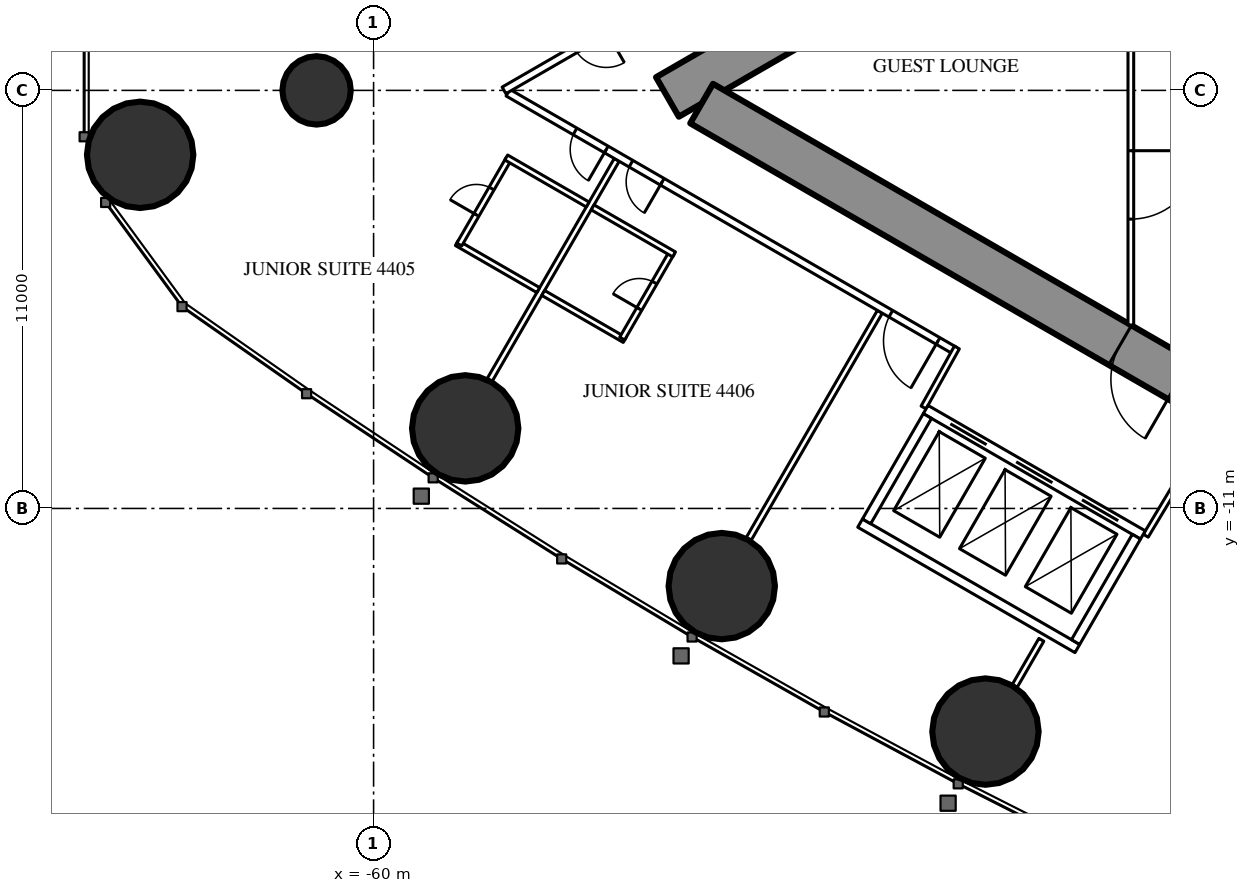
"""IFC4 building model, lengths in metres.
Left out: names, types, materials, properties, quantities, classifications, styles, units other than length and angle.
Written with IfcOpenShell. Run it as: python <this file> out.ifc"""

import sys

from ifc_helpers import new_model, si_unit, direction, frame, frame_2d, origin, origin_2d, place, context, subcontext, project, spatial, rectangle, circle, extrude, element, fill, save


model = new_model("IFC4")
c1 = context("Model", 3, precision=1e-05, world=origin(), true_north=direction((0.0, 1.0)))
c2 = subcontext(c1, "Body", "Model", "MODEL_VIEW")
j1 = project(units=[si_unit("LENGTHUNIT", "METRE"), si_unit("PLANEANGLEUNIT", "RADIAN")], contexts=[c1])
p1 = place(None, origin())
s1 = spatial("IfcSite", under=j1, at=p1, CompositionType="ELEMENT")
p2 = place(p1, origin())
s2 = spatial("IfcBuilding", under=s1, at=p2, CompositionType="ELEMENT")
p3 = place(p2, frame((0.0, 0.0, 166.8)))
s3 = spatial("IfcBuildingStorey", under=s2, at=p3, CompositionType="ELEMENT", Elevation=166.8)
for number, where, z_axis, x_axis in (
    (1, (-66.143, -1.695, 0.0), (0.0, 0.0, 1.0), (1.0, 0.0, 0.0)),
    (2, (-57.59, -8.893, 0.0), (0.0, 0.0, 1.0), (1.0, 0.0, 0.0)),
    (3, (-50.839, -13.043, 0.0), (0.0, 0.0, 1.0), (1.0, 0.0, 0.0)),
    (4, (-43.9, -16.871, 0.0), (0.0, 0.0, 1.0), (1.0, 0.0, 0.0)),
):
    element("IfcColumn", number, at=place(p3, frame(where, z_axis=z_axis, x_axis=x_axis)), inside=s3, PredefinedType="COLUMN", context=c2, shape_type="SweptSolid", body=[
        extrude(circle(Radius=1.4, at=origin_2d()), origin(), (0.0, 0.0, 1.0), 3.5),
    ])
p4 = place(p3, frame((-61.5, 0.0, 0.0), z_axis=(0.0, 0.0, 1.0), x_axis=(1.0, 0.0, 0.0)))
e5 = element("IfcColumn", 5, at=p4, inside=s3, PredefinedType="COLUMN", context=c2, shape_type="SweptSolid", body=[
    extrude(circle(Radius=0.9, at=origin_2d()), origin(), (0.0, 0.0, 1.0), 3.5),
])
p5 = place(p3, frame((-27.2, 14.3, 0.0), z_axis=(0.0, 0.0, 1.0), x_axis=(-0.866026593062, -0.499997940104, 0.0)))
e6 = element("IfcWall", 6, at=p5, inside=s3, PredefinedType="SHEAR", context=c2, shape_type="SweptSolid", body=[
    extrude(rectangle(XDim=28.946, YDim=1.2, at=frame_2d((14.473, 0.0))), origin(), (0.0, 0.0, 1.0), 3.5),
])
p6 = place(p5, frame((4.6, 0.0, 0.0)))
e7 = element("IfcOpeningElement", 7, at=p6, cuts=e6, PredefinedType="OPENING", context=c2, shape_type="SweptSolid", body=[
    extrude(rectangle(XDim=1.0, YDim=2.2, at=frame_2d((0.5, 1.1))), frame((0.0, 0.61, 0.0), z_axis=(0.0, -1.0, 0.0), x_axis=(1.0, 0.0, 0.0)), (0.0, 0.0, 1.0), 1.22),
])
p7 = place(p5, frame((13.395, 0.0, 0.0)))
e8 = element("IfcOpeningElement", 8, at=p7, cuts=e6, PredefinedType="OPENING", context=c2, shape_type="SweptSolid", body=[
    extrude(rectangle(XDim=1.8, YDim=2.2, at=frame_2d((0.9, 1.1))), frame((0.0, 0.61, 0.0), z_axis=(0.0, -1.0, 0.0), x_axis=(1.0, 0.0, 0.0)), (0.0, 0.0, 1.0), 1.22),
])
p8 = place(p3, frame((-27.2, -14.3, 0.0), z_axis=(0.0, 0.0, 1.0), x_axis=(-0.866024021859, 0.500002393557, 0.0)))
e9 = element("IfcWall", 9, at=p8, inside=s3, PredefinedType="SHEAR", context=c2, shape_type="SweptSolid", body=[
    extrude(rectangle(XDim=27.907, YDim=1.2, at=frame_2d((13.954, 0.0))), origin(), (0.0, 0.0, 1.0), 3.5),
])
p9 = place(p8, frame((4.6, 0.0, 0.0)))
e10 = element("IfcOpeningElement", 10, at=p9, cuts=e9, PredefinedType="OPENING", context=c2, shape_type="SweptSolid", body=[
    extrude(rectangle(XDim=1.0, YDim=2.2, at=frame_2d((0.5, 1.1))), frame((0.0, 0.61, 0.0), z_axis=(0.0, -1.0, 0.0), x_axis=(1.0, 0.0, 0.0)), (0.0, 0.0, 1.0), 1.22),
])
p10 = place(p8, frame((13.395, 0.0, 0.0)))
e11 = element("IfcOpeningElement", 11, at=p10, cuts=e9, PredefinedType="OPENING", context=c2, shape_type="SweptSolid", body=[
    extrude(rectangle(XDim=1.8, YDim=2.2, at=frame_2d((0.9, 1.1))), frame((0.0, 0.61, 0.0), z_axis=(0.0, -1.0, 0.0), x_axis=(1.0, 0.0, 0.0)), (0.0, 0.0, 1.0), 1.22),
])
p11 = place(p3, frame((-46.679, -5.825, 0.0), z_axis=(0.0, 0.0, 1.0), x_axis=(-0.500006839597, -0.866021454905, 0.0)))
e12 = element("IfcWall", 12, at=p11, inside=s3, PredefinedType="PARTITIONING", context=c2, shape_type="SweptSolid", body=[
    extrude(rectangle(XDim=6.911, YDim=0.15, at=frame_2d((3.456, 0.0))), origin(), (0.0, 0.0, 1.0), 2.3),
])
p12 = place(p3, frame((-53.602, -1.828, 0.0), z_axis=(0.0, 0.0, 1.0), x_axis=(-0.49999191814, -0.866030069798, 0.0)))
e13 = element("IfcWall", 13, at=p12, inside=s3, PredefinedType="PARTITIONING", context=c2, shape_type="SweptSolid", body=[
    extrude(rectangle(XDim=6.692, YDim=0.15, at=frame_2d((3.346, 0.0))), origin(), (0.0, 0.0, 1.0), 2.3),
])
p13 = place(p3, frame((-42.429, -14.457, 0.0), z_axis=(0.0, 0.0, 1.0), x_axis=(-0.5000578829, -0.865991982497, 0.0)))
e14 = element("IfcWall", 14, at=p13, inside=s3, PredefinedType="PARTITIONING", context=c2, shape_type="SweptSolid", body=[
    extrude(rectangle(XDim=1.407, YDim=0.15, at=frame_2d((0.704, 0.0))), origin(), (0.0, 0.0, 1.0), 3.25),
])
p14 = place(p3, frame((-44.715, -6.844, 0.0), z_axis=(0.0, 0.0, 1.0), x_axis=(-0.866025261224, 0.500000246922, 0.0)))
e15 = element("IfcWall", 15, at=p14, inside=s3, PredefinedType="PARTITIONING", context=c2, shape_type="SweptSolid", body=[
    extrude(rectangle(XDim=13.567, YDim=0.2, at=frame_2d((6.783, 0.0))), origin(), (0.0, 0.0, 1.0), 3.25),
])
p15 = place(p14, frame((10.579, 0.0, 0.0)))
e16 = element("IfcOpeningElement", 16, at=p15, cuts=e15, PredefinedType="OPENING", context=c2, shape_type="SweptSolid", body=[
    extrude(rectangle(XDim=0.95, YDim=2.2, at=frame_2d((0.475, 1.1))), frame((0.0, 0.11, 0.0), z_axis=(0.0, -1.0, 0.0), x_axis=(1.0, 0.0, 0.0)), (0.0, 0.0, 1.0), 0.22),
])
p16 = place(p14, frame((8.879, 0.0, 0.0)))
e17 = element("IfcOpeningElement", 17, at=p16, cuts=e15, PredefinedType="OPENING", context=c2, shape_type="SweptSolid", body=[
    extrude(rectangle(XDim=0.95, YDim=2.2, at=frame_2d((0.475, 1.1))), frame((0.0, 0.11, 0.0), z_axis=(0.0, -1.0, 0.0), x_axis=(1.0, 0.0, 0.0)), (0.0, 0.0, 1.0), 0.22),
])
p17 = place(p14, frame((0.5, 0.0, 0.0)))
e18 = element("IfcOpeningElement", 18, at=p17, cuts=e15, PredefinedType="OPENING", context=c2, shape_type="SweptSolid", body=[
    extrude(rectangle(XDim=1.435, YDim=2.2, at=frame_2d((0.718, 1.1))), frame((0.0, 0.11, 0.0), z_axis=(0.0, -1.0, 0.0), x_axis=(1.0, 0.0, 0.0)), (0.0, 0.0, 1.0), 0.22),
])
for number, where, z_axis, x_axis in (
    (19, (-39.683, -11.718, 0.0), (0.0, 0.0, 1.0), (0.514, 0.858, 0.0)),
    (20, (-44.652, -6.764, 0.0), (0.0, 0.0, 1.0), (-0.485, -0.874, 0.0)),
):
    element("IfcWall", number, at=place(p3, frame(where, z_axis=z_axis, x_axis=x_axis)), inside=s3, PredefinedType="PARTITIONING", context=c2, shape_type="SweptSolid", body=[
        extrude(rectangle(XDim=1.805, YDim=0.15, at=frame_2d((0.903, 0.0))), origin(), (0.0, 0.0, 1.0), 3.25),
    ])
p18 = place(p3, frame((-46.65, 5.726, 0.0), z_axis=(0.0, 0.0, 1.0), x_axis=(-0.866027963864, -0.499995565786, 0.0)))
e21 = element("IfcWall", 21, at=p18, inside=s3, PredefinedType="PARTITIONING", context=c2, shape_type="SweptSolid", body=[
    extrude(rectangle(XDim=11.452, YDim=0.2, at=frame_2d((5.726, 0.0))), origin(), (0.0, 0.0, 1.0), 3.25),
])
p19 = place(p18, frame((4.294, 0.0, 0.0)))
e22 = element("IfcOpeningElement", 22, at=p19, cuts=e21, PredefinedType="OPENING", context=c2, shape_type="SweptSolid", body=[
    extrude(rectangle(XDim=0.95, YDim=2.2, at=frame_2d((0.475, 1.1))), frame((0.0, 0.11, 0.0), z_axis=(0.0, -1.0, 0.0), x_axis=(1.0, 0.0, 0.0)), (0.0, 0.0, 1.0), 0.22),
])
p20 = place(p18, frame((8.344, 0.0, 0.0)))
e23 = element("IfcOpeningElement", 23, at=p20, cuts=e21, PredefinedType="OPENING", context=c2, shape_type="SweptSolid", body=[
    extrude(rectangle(XDim=0.95, YDim=2.2, at=frame_2d((0.475, 1.1))), frame((0.0, 0.11, 0.0), z_axis=(0.0, -1.0, 0.0), x_axis=(1.0, 0.0, 0.0)), (0.0, 0.0, 1.0), 0.22),
])
p21 = place(p3, frame((-55.667, -5.255, 0.0), z_axis=(0.0, 0.0, 1.0), x_axis=(-0.866006523861, 0.500032699561, 0.0)))
e24 = element("IfcWall", 24, at=p21, inside=s3, PredefinedType="PARTITIONING", context=c2, shape_type="SweptSolid", body=[
    extrude(rectangle(XDim=2.475, YDim=0.15, at=frame_2d((1.237, 0.0))), origin(), (0.0, 0.0, 1.0), 3.25),
])
p22 = place(p3, frame((-56.446, -1.803, 0.0), z_axis=(0.0, 0.0, 1.0), x_axis=(-0.499936506574, -0.866062058628, 0.0)))
e25 = element("IfcWall", 25, at=p22, inside=s3, PredefinedType="PARTITIONING", context=c2, shape_type="SweptSolid", body=[
    extrude(rectangle(XDim=2.6, YDim=0.15, at=frame_2d((1.3, 0.0))), origin(), (0.0, 0.0, 1.0), 3.25),
])
p23 = place(p22, frame((0.9, 0.0, 0.0)))
e26 = element("IfcOpeningElement", 26, at=p23, cuts=e25, PredefinedType="OPENING", context=c2, shape_type="SweptSolid", body=[
    extrude(rectangle(XDim=0.8, YDim=2.2, at=frame_2d((0.4, 1.1))), frame((0.0, 0.085, 0.0), z_axis=(0.0, -1.0, 0.0), x_axis=(1.0, 0.0, 0.0)), (0.0, 0.0, 1.0), 0.17),
])
for number, where, z_axis, x_axis in (
    (27, (-54.367, -3.003, 0.0), (0.0, 0.0, 1.0), (-0.866, 0.5, 0.0)),
    (28, (-53.394, -6.567, 0.0), (0.0, 0.0, 1.0), (-0.866, 0.5, 0.0)),
):
    element("IfcWall", number, at=place(p3, frame(where, z_axis=z_axis, x_axis=x_axis)), inside=s3, PredefinedType="PARTITIONING", context=c2, shape_type="SweptSolid", body=[
        extrude(rectangle(XDim=2.475, YDim=0.15, at=frame_2d((1.238, 0.0))), origin(), (0.0, 0.0, 1.0), 3.25),
    ])
p24 = place(p3, frame((-52.159, -4.278, 0.0), z_axis=(0.0, 0.0, 1.0), x_axis=(-0.500047596559, -0.865997922154, 0.0)))
e29 = element("IfcWall", 29, at=p24, inside=s3, PredefinedType="PARTITIONING", context=c2, shape_type="SweptSolid", body=[
    extrude(rectangle(XDim=2.6, YDim=0.15, at=frame_2d((1.3, 0.0))), origin(), (0.0, 0.0, 1.0), 3.25),
])
p25 = place(p24, frame((0.9, 0.0, 0.0)))
e30 = element("IfcOpeningElement", 30, at=p25, cuts=e29, PredefinedType="OPENING", context=c2, shape_type="SweptSolid", body=[
    extrude(rectangle(XDim=0.8, YDim=2.2, at=frame_2d((0.4, 1.1))), frame((0.0, 0.085, 0.0), z_axis=(0.0, -1.0, 0.0), x_axis=(1.0, 0.0, 0.0)), (0.0, 0.0, 1.0), 0.17),
])
p26 = place(p3, frame((-52.094, -4.315, 0.0), z_axis=(0.0, 0.0, 1.0), x_axis=(-0.866006523861, 0.500032699561, 0.0)))
e31 = element("IfcWall", 31, at=p26, inside=s3, PredefinedType="PARTITIONING", context=c2, shape_type="SweptSolid", body=[
    extrude(rectangle(XDim=2.475, YDim=0.15, at=frame_2d((1.237, 0.0))), origin(), (0.0, 0.0, 1.0), 2.45),
])
p27 = place(p3, frame((-40.075, 1.2, 0.0), z_axis=(0.0, 0.0, 1.0), x_axis=(0.0, -1.0, 0.0)))
e32 = element("IfcWall", 32, at=p27, inside=s3, PredefinedType="PARTITIONING", context=c2, shape_type="SweptSolid", body=[
    extrude(rectangle(XDim=7.374, YDim=0.15, at=frame_2d((3.687, 0.0))), origin(), (0.0, 0.0, 1.0), 3.25),
])
p28 = place(p27, frame((2.787, 0.0, 0.0)))
e33 = element("IfcOpeningElement", 33, at=p28, cuts=e32, PredefinedType="OPENING", context=c2, shape_type="SweptSolid", body=[
    extrude(rectangle(XDim=1.8, YDim=2.2, at=frame_2d((0.9, 1.1))), frame((0.0, 0.085, 0.0), z_axis=(0.0, -1.0, 0.0), x_axis=(1.0, 0.0, 0.0)), (0.0, 0.0, 1.0), 0.17),
])
p29 = place(p3, frame((-39.758, -11.697, 0.0), z_axis=(0.0, 0.0, 1.0), x_axis=(-0.866024194504, 0.500002094529, 0.0)))
e34 = element("IfcWall", 34, at=p29, inside=s3, PredefinedType="PARTITIONING", context=c2, shape_type="SweptSolid", body=[
    extrude(rectangle(XDim=6.6, YDim=0.25, at=frame_2d((3.3, 0.0))), origin(), (0.0, 0.0, 1.0), 3.25),
])
p30 = place(p29, frame((0.75, 0.0, 0.0)))
e35 = element("IfcOpeningElement", 35, at=p30, cuts=e34, PredefinedType="OPENING", context=c2, shape_type="SweptSolid", body=[
    extrude(rectangle(XDim=1.1, YDim=2.2, at=frame_2d((0.55, 1.1))), frame((0.0, 0.135, 0.0), z_axis=(0.0, -1.0, 0.0), x_axis=(1.0, 0.0, 0.0)), (0.0, 0.0, 1.0), 0.27),
])
p31 = place(p29, frame((2.75, 0.0, 0.0)))
e36 = element("IfcOpeningElement", 36, at=p31, cuts=e34, PredefinedType="OPENING", context=c2, shape_type="SweptSolid", body=[
    extrude(rectangle(XDim=1.1, YDim=2.2, at=frame_2d((0.55, 1.1))), frame((0.0, 0.135, 0.0), z_axis=(0.0, -1.0, 0.0), x_axis=(1.0, 0.0, 0.0)), (0.0, 0.0, 1.0), 0.27),
])
p32 = place(p29, frame((4.75, 0.0, 0.0)))
e37 = element("IfcOpeningElement", 37, at=p32, cuts=e34, PredefinedType="OPENING", context=c2, shape_type="SweptSolid", body=[
    extrude(rectangle(XDim=1.1, YDim=2.2, at=frame_2d((0.55, 1.1))), frame((0.0, 0.135, 0.0), z_axis=(0.0, -1.0, 0.0), x_axis=(1.0, 0.0, 0.0)), (0.0, 0.0, 1.0), 0.27),
])
p33 = place(p3, frame((-41.482, -14.686, 0.0), z_axis=(0.0, 0.0, 1.0), x_axis=(-0.86603344179, 0.499986077507, 0.0)))
e38 = element("IfcWall", 38, at=p33, inside=s3, PredefinedType="PARTITIONING", context=c2, shape_type="SweptSolid", body=[
    extrude(rectangle(XDim=6.6, YDim=0.25, at=frame_2d((3.3, 0.0))), origin(), (0.0, 0.0, 1.0), 3.25),
])
for number, where, z_axis, x_axis in (
    (39, (-39.928, -11.743, 0.0), (0.0, 0.0, 1.0), (-0.5, -0.866, 0.0)),
    (40, (-45.428, -8.568, 0.0), (0.0, 0.0, 1.0), (-0.5, -0.866, 0.0)),
):
    element("IfcWall", number, at=place(p3, frame(where, z_axis=z_axis, x_axis=x_axis)), inside=s3, PredefinedType="PARTITIONING", context=c2, shape_type="SweptSolid", body=[
        extrude(rectangle(XDim=3.201, YDim=0.25, at=frame_2d((1.6, 0.0))), origin(), (0.0, 0.0, 1.0), 3.25),
    ])
p34 = place(p23, origin())
e41 = element("IfcDoor", 41, at=p34, inside=s3, OperationType="SINGLE_SWING_RIGHT", PredefinedType="DOOR", context=c2, shape_type="SweptSolid", body=[
    extrude(rectangle(XDim=0.8, YDim=2.2, at=frame_2d((0.4, 1.1))), frame((0.0, 0.025, 0.0), z_axis=(0.0, -1.0, 0.0), x_axis=(1.0, 0.0, 0.0)), (0.0, 0.0, 1.0), 0.05),
])
fill(e26, e41)
p35 = place(p15, origin())
e42 = element("IfcDoor", 42, at=p35, inside=s3, OperationType="SINGLE_SWING_LEFT", PredefinedType="DOOR", context=c2, shape_type="SweptSolid", body=[
    extrude(rectangle(XDim=0.95, YDim=2.2, at=frame_2d((0.475, 1.1))), frame((0.0, 0.025, 0.0), z_axis=(0.0, -1.0, 0.0), x_axis=(1.0, 0.0, 0.0)), (0.0, 0.0, 1.0), 0.05),
])
fill(e16, e42)
p36 = place(p25, origin())
e43 = element("IfcDoor", 43, at=p36, inside=s3, OperationType="SINGLE_SWING_RIGHT", PredefinedType="DOOR", context=c2, shape_type="SweptSolid", body=[
    extrude(rectangle(XDim=0.8, YDim=2.2, at=frame_2d((0.4, 1.1))), frame((0.0, 0.025, 0.0), z_axis=(0.0, -1.0, 0.0), x_axis=(1.0, 0.0, 0.0)), (0.0, 0.0, 1.0), 0.05),
])
fill(e30, e43)
p37 = place(p16, origin())
e44 = element("IfcDoor", 44, at=p37, inside=s3, OperationType="SINGLE_SWING_LEFT", PredefinedType="DOOR", context=c2, shape_type="SweptSolid", body=[
    extrude(rectangle(XDim=0.95, YDim=2.2, at=frame_2d((0.475, 1.1))), frame((0.0, 0.025, 0.0), z_axis=(0.0, -1.0, 0.0), x_axis=(1.0, 0.0, 0.0)), (0.0, 0.0, 1.0), 0.05),
])
fill(e17, e44)
p38 = place(p17, origin())
e45 = element("IfcDoor", 45, at=p38, inside=s3, OperationType="SINGLE_SWING_LEFT", PredefinedType="DOOR", context=c2, shape_type="SweptSolid", body=[
    extrude(rectangle(XDim=1.435, YDim=2.2, at=frame_2d((0.718, 1.1))), frame((0.0, 0.025, 0.0), z_axis=(0.0, -1.0, 0.0), x_axis=(1.0, 0.0, 0.0)), (0.0, 0.0, 1.0), 0.05),
])
fill(e18, e45)
p39 = place(p28, origin())
e46 = element("IfcDoor", 46, at=p39, inside=s3, OperationType="DOUBLE_DOOR_SINGLE_SWING", PredefinedType="DOOR", context=c2, shape_type="SweptSolid", body=[
    extrude(rectangle(XDim=1.8, YDim=2.2, at=frame_2d((0.9, 1.1))), frame((0.0, 0.025, 0.0), z_axis=(0.0, -1.0, 0.0), x_axis=(1.0, 0.0, 0.0)), (0.0, 0.0, 1.0), 0.05),
])
fill(e33, e46)
p40 = place(p10, origin())
e47 = element("IfcDoor", 47, at=p40, inside=s3, OperationType="DOUBLE_DOOR_SINGLE_SWING", PredefinedType="DOOR", context=c2, shape_type="SweptSolid", body=[
    extrude(rectangle(XDim=1.8, YDim=2.2, at=frame_2d((0.9, 1.1))), frame((0.0, 0.025, 0.0), z_axis=(0.0, -1.0, 0.0), x_axis=(1.0, 0.0, 0.0)), (0.0, 0.0, 1.0), 0.05),
])
fill(e11, e47)
p41 = place(p30, origin())
e48 = element("IfcDoor", 48, at=p41, inside=s3, OperationType="DOUBLE_DOOR_SLIDING", PredefinedType="USERDEFINED", context=c2, shape_type="SweptSolid", body=[
    extrude(rectangle(XDim=1.1, YDim=2.2, at=frame_2d((0.55, 1.1))), frame((0.0, 0.025, 0.0), z_axis=(0.0, -1.0, 0.0), x_axis=(1.0, 0.0, 0.0)), (0.0, 0.0, 1.0), 0.05),
])
fill(e35, e48)
p42 = place(p31, origin())
e49 = element("IfcDoor", 49, at=p42, inside=s3, OperationType="DOUBLE_DOOR_SLIDING", PredefinedType="USERDEFINED", context=c2, shape_type="SweptSolid", body=[
    extrude(rectangle(XDim=1.1, YDim=2.2, at=frame_2d((0.55, 1.1))), frame((0.0, 0.025, 0.0), z_axis=(0.0, -1.0, 0.0), x_axis=(1.0, 0.0, 0.0)), (0.0, 0.0, 1.0), 0.05),
])
fill(e36, e49)
p43 = place(p32, origin())
e50 = element("IfcDoor", 50, at=p43, inside=s3, OperationType="DOUBLE_DOOR_SLIDING", PredefinedType="USERDEFINED", context=c2, shape_type="SweptSolid", body=[
    extrude(rectangle(XDim=1.1, YDim=2.2, at=frame_2d((0.55, 1.1))), frame((0.0, 0.025, 0.0), z_axis=(0.0, -1.0, 0.0), x_axis=(1.0, 0.0, 0.0)), (0.0, 0.0, 1.0), 0.05),
])
fill(e37, e50)
save(model, sys.argv[1])
